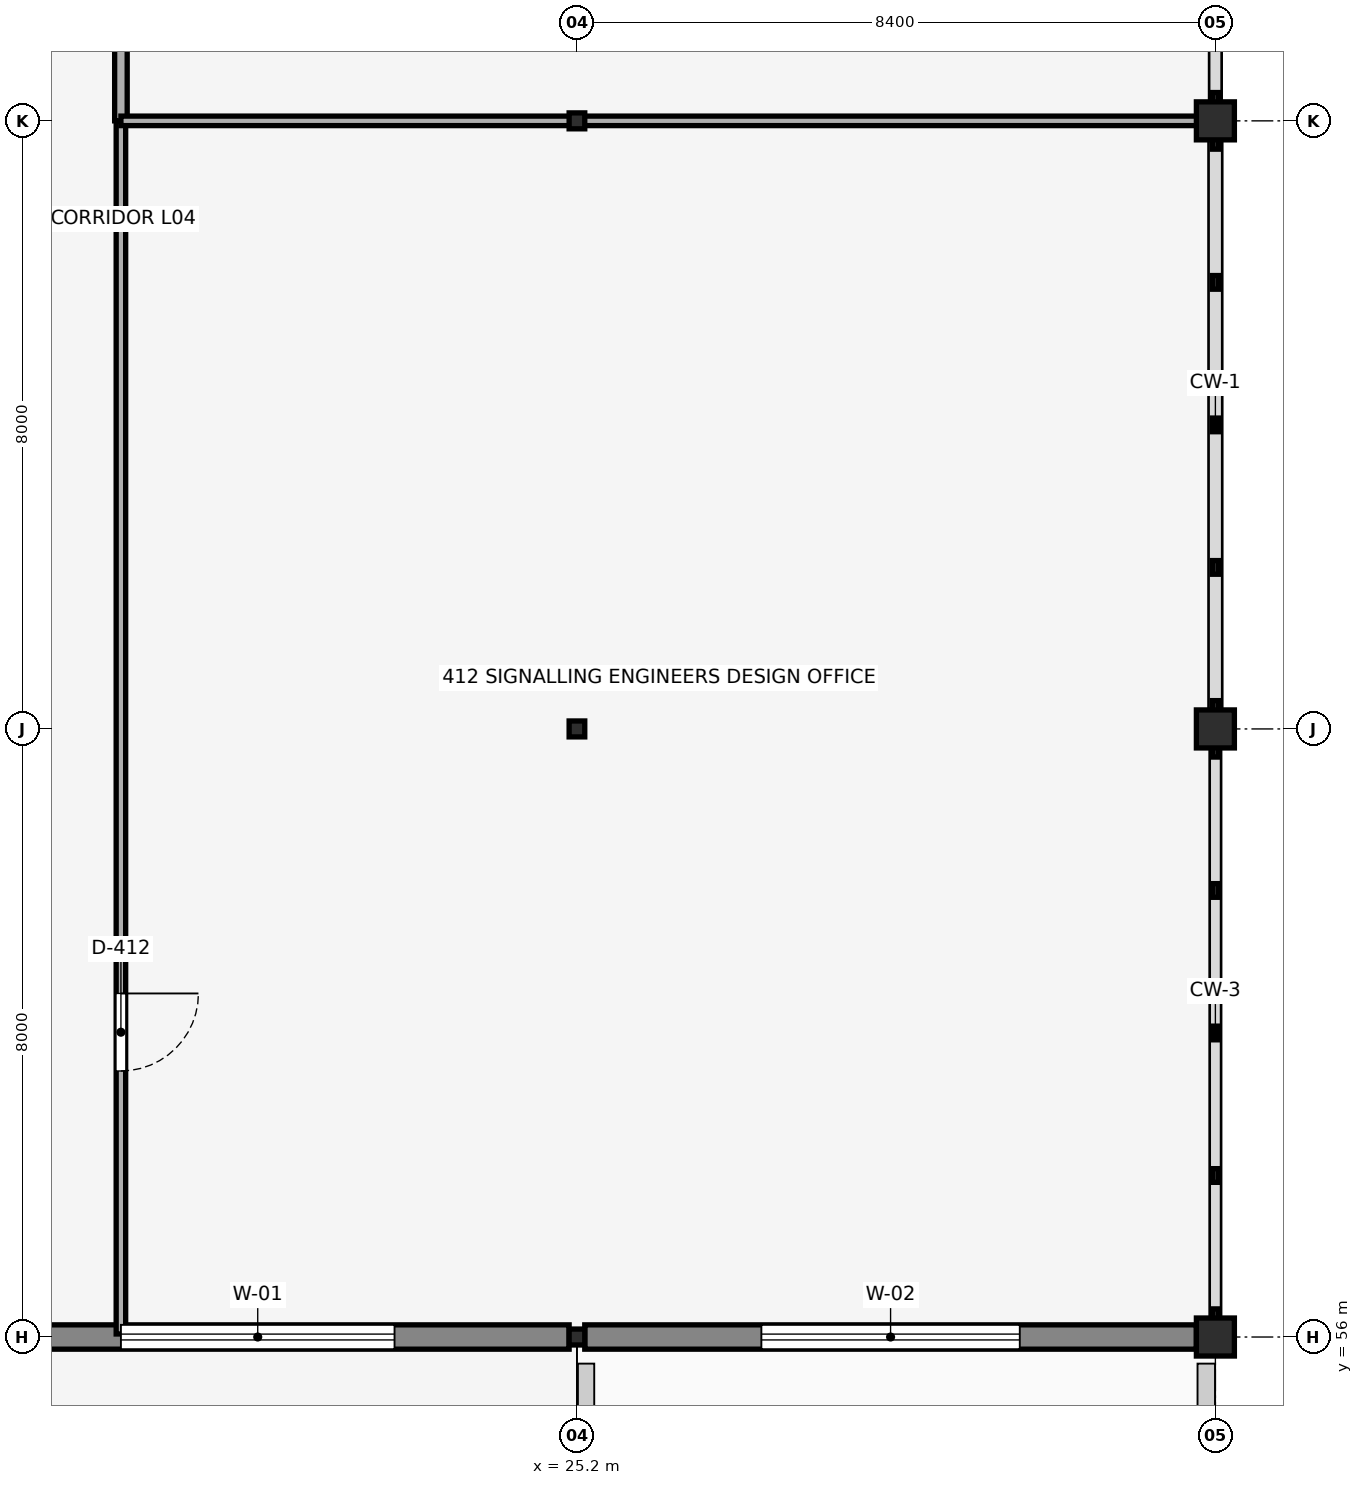
"""IFC4 building model, lengths in metres.
Left out: names, types, materials, properties, quantities, classifications, styles, units other than length and angle.
Written with IfcOpenShell. Run it as: python <this file> out.ifc"""

import sys

from ifc_helpers import new_model, si_unit, direction, frame, frame_2d, origin, origin_2d, place, context, subcontext, project, spatial, rectangle, i_section, extrude, element, fill, save


model = new_model("IFC4")
c1 = context("Model", 3, precision=1e-05, world=origin(), true_north=direction((0.0, 1.0)))
c2 = subcontext(c1, "Body", "Model", "MODEL_VIEW")
j1 = project(units=[si_unit("LENGTHUNIT", "METRE"), si_unit("PLANEANGLEUNIT", "RADIAN")], contexts=[c1])
p1 = place(None, origin())
s1 = spatial("IfcSite", under=j1, at=p1, CompositionType="ELEMENT")
p2 = place(p1, origin())
s2 = spatial("IfcBuilding", under=s1, at=p2, CompositionType="ELEMENT")
p3 = place(p2, frame((0.0, 0.0, 17.2)))
s3 = spatial("IfcBuildingStorey", under=s2, at=p3, CompositionType="ELEMENT", Elevation=17.2)
for number, where, z_axis, x_axis in (
    (1, (25.2, 56.0, 0.0), (0.0, 0.0, 1.0), (1.0, 0.0, 0.0)),
    (2, (25.2, 64.0, 0.0), (0.0, 0.0, 1.0), (1.0, 0.0, 0.0)),
    (3, (25.2, 72.0, 0.0), (0.0, 0.0, 1.0), (1.0, 0.0, 0.0)),
):
    element("IfcColumn", number, at=place(p3, frame(where, z_axis=z_axis, x_axis=x_axis)), inside=s3, PredefinedType="COLUMN", context=c2, shape_type="SweptSolid", body=[
        extrude(i_section(OverallWidth=0.206, OverallDepth=0.21, WebThickness=0.01, FlangeThickness=0.014, FilletRadius=0.01, at=origin_2d()), origin(), (0.0, 0.0, 1.0), 3.59),
    ])
for number, where, z_axis, x_axis in (
    (4, (33.6, 56.0, 0.0), (0.0, 0.0, 1.0), (1.0, 0.0, 0.0)),
    (5, (33.6, 64.0, 0.0), (0.0, 0.0, 1.0), (1.0, 0.0, 0.0)),
    (6, (33.6, 72.0, 0.0), (0.0, 0.0, 1.0), (1.0, 0.0, 0.0)),
):
    element("IfcColumn", number, at=place(p3, frame(where, z_axis=z_axis, x_axis=x_axis)), inside=s3, PredefinedType="COLUMN", context=c2, shape_type="SweptSolid", body=[
        extrude(rectangle(XDim=0.5, YDim=0.5, at=origin_2d()), origin(), (0.0, 0.0, 1.0), 3.59),
    ])
p4 = place(p3, frame((16.903, 56.0, 0.0), z_axis=(0.0, 0.0, 1.0), x_axis=(1.0, 0.0, 0.0)))
e7 = element("IfcWall", 7, at=p4, inside=s3, PredefinedType="SOLIDWALL", context=c2, shape_type="SweptSolid", body=[
    extrude(rectangle(XDim=8.194, YDim=0.32, at=frame_2d((4.097, 0.0))), origin(), (0.0, 0.0, 1.0), 3.33),
])
p5 = place(p4, frame((2.297, 0.0, 0.9), z_axis=(0.0, 0.0, 1.0), x_axis=(1.0, 0.0, 0.0)))
e8 = element("IfcOpeningElement", 8, at=p5, cuts=e7, PredefinedType="OPENING", context=c2, shape_type="SweptSolid", body=[
    extrude(rectangle(XDim=3.6, YDim=1.8, at=frame_2d((1.8, 0.9))), frame((0.0, 0.17, 0.0), z_axis=(0.0, -1.0, 0.0), x_axis=(1.0, 0.0, 0.0)), (0.0, 0.0, 1.0), 0.34),
])
p6 = place(p3, frame((25.303, 56.0, 0.0), z_axis=(0.0, 0.0, 1.0), x_axis=(1.0, 0.0, 0.0)))
e9 = element("IfcWall", 9, at=p6, inside=s3, PredefinedType="SOLIDWALL", context=c2, shape_type="SweptSolid", body=[
    extrude(rectangle(XDim=8.047, YDim=0.32, at=frame_2d((4.023, 0.0))), origin(), (0.0, 0.0, 1.0), 3.33),
])
p7 = place(p6, frame((2.323, 0.0, 0.9), z_axis=(0.0, 0.0, 1.0), x_axis=(1.0, 0.0, 0.0)))
e10 = element("IfcOpeningElement", 10, at=p7, cuts=e9, PredefinedType="OPENING", context=c2, shape_type="SweptSolid", body=[
    extrude(rectangle(XDim=3.4, YDim=1.7, at=frame_2d((1.7, 0.85))), frame((0.0, 0.17, 0.0), z_axis=(0.0, -1.0, 0.0), x_axis=(1.0, 0.0, 0.0)), (0.0, 0.0, 1.0), 0.34),
])
p8 = place(p3, frame((25.32, 48.12, 0.0), z_axis=(0.0, 0.0, 1.0), x_axis=(0.0, 1.0, 0.0)))
e11 = element("IfcWall", 11, at=p8, inside=s3, PredefinedType="PARAPET", context=c2, shape_type="SweptSolid", body=[
    extrude(rectangle(XDim=7.53, YDim=0.215, at=frame_2d((3.765, 0.0))), origin(), (0.0, 0.0, 1.0), 1.05),
])
p9 = place(p3, frame((33.48, 55.65, 0.0), z_axis=(0.0, 0.0, 1.0), x_axis=(0.0, -1.0, 0.0)))
e12 = element("IfcWall", 12, at=p9, inside=s3, PredefinedType="PARAPET", context=c2, shape_type="SweptSolid", body=[
    extrude(rectangle(XDim=7.53, YDim=0.23, at=frame_2d((3.765, 0.0))), origin(), (0.0, 0.0, 1.0), 1.05),
])
p10 = place(p3, frame((19.2, 56.04, 0.0), z_axis=(0.0, 0.0, 1.0), x_axis=(0.0, 1.0, 0.0)))
e13 = element("IfcWall", 13, at=p10, inside=s3, PredefinedType="PARTITIONING", context=c2, shape_type="SweptSolid", body=[
    extrude(rectangle(XDim=15.96, YDim=0.125, at=frame_2d((7.98, 0.0))), origin(), (0.0, 0.0, 1.0), 3.59),
])
p11 = place(p10, frame((4.48, 0.0, 0.0), z_axis=(0.0, 0.0, 1.0), x_axis=(-1.0, 0.0, 0.0)))
e14 = element("IfcOpeningElement", 14, at=p11, cuts=e13, PredefinedType="OPENING", context=c2, shape_type="SweptSolid", body=[
    extrude(rectangle(XDim=1.02, YDim=2.16, at=frame_2d((0.51, 1.08))), frame((0.0, 0.073, 0.0), z_axis=(0.0, -1.0, 0.0), x_axis=(1.0, 0.0, 0.0)), (0.0, 0.0, 1.0), 0.145),
])
p12 = place(p3, frame((19.2, 72.0, 0.0), z_axis=(0.0, 0.0, 1.0), x_axis=(0.0, 1.0, 0.0)))
e15 = element("IfcWall", 15, at=p12, inside=s3, PredefinedType="PARTITIONING", context=c2, shape_type="SweptSolid", body=[
    extrude(rectangle(XDim=16.0, YDim=0.165, at=frame_2d((8.0, 0.0))), origin(), (0.0, 0.0, 1.0), 3.59),
])
p13 = place(p12, frame((4.8, 0.0, 0.0), z_axis=(0.0, 0.0, 1.0), x_axis=(-1.0, 0.0, 0.0)))
e16 = element("IfcOpeningElement", 16, at=p13, cuts=e15, PredefinedType="OPENING", context=c2, shape_type="SweptSolid", body=[
    extrude(rectangle(XDim=1.3, YDim=2.25, at=frame_2d((0.65, 1.125))), frame((0.0, 0.093, 0.0), z_axis=(0.0, -1.0, 0.0), x_axis=(1.0, 0.0, 0.0)), (0.0, 0.0, 1.0), 0.185),
])
p14 = place(p3, frame((19.2, 72.0, 0.0), z_axis=(0.0, 0.0, 1.0), x_axis=(1.0, 0.0, 0.0)))
e17 = element("IfcWall", 17, at=p14, inside=s3, PredefinedType="PARTITIONING", context=c2, shape_type="SweptSolid", body=[
    extrude(rectangle(XDim=5.907, YDim=0.125, at=frame_2d((2.954, 0.0))), origin(), (0.0, 0.0, 1.0), 3.137),
])
p15 = place(p3, frame((25.293, 72.0, 0.0), z_axis=(0.0, 0.0, 1.0), x_axis=(1.0, 0.0, 0.0)))
e18 = element("IfcWall", 18, at=p15, inside=s3, PredefinedType="PARTITIONING", context=c2, shape_type="SweptSolid", body=[
    extrude(rectangle(XDim=8.067, YDim=0.125, at=frame_2d((4.034, 0.0))), origin(), (0.0, 0.0, 1.0), 3.137),
])
p16 = place(p5, origin())
e19 = element("IfcWindow", 19, at=p16, inside=s3, PartitioningType="TRIPLE_PANEL_VERTICAL", PredefinedType="WINDOW", context=c2, shape_type="SweptSolid", body=[
    extrude(rectangle(XDim=3.6, YDim=1.8, at=frame_2d((1.8, 0.9))), frame((0.0, 0.03, 0.0), z_axis=(0.0, -1.0, 0.0), x_axis=(1.0, 0.0, 0.0)), (0.0, 0.0, 1.0), 0.06),
])
fill(e8, e19)
p17 = place(p7, origin())
e20 = element("IfcWindow", 20, at=p17, inside=s3, PartitioningType="TRIPLE_PANEL_VERTICAL", PredefinedType="WINDOW", context=c2, shape_type="SweptSolid", body=[
    extrude(rectangle(XDim=3.4, YDim=1.7, at=frame_2d((1.7, 0.85))), frame((0.0, 0.03, 0.0), z_axis=(0.0, -1.0, 0.0), x_axis=(1.0, 0.0, 0.0)), (0.0, 0.0, 1.0), 0.06),
])
fill(e10, e20)
p18 = place(p11, origin())
e21 = element("IfcDoor", 21, at=p18, inside=s3, OperationType="SINGLE_SWING_LEFT", PredefinedType="DOOR", context=c2, shape_type="SweptSolid", body=[
    extrude(rectangle(XDim=1.02, YDim=2.16, at=frame_2d((0.51, 1.08))), frame((0.0, 0.025, 0.0), z_axis=(0.0, -1.0, 0.0), x_axis=(1.0, 0.0, 0.0)), (0.0, 0.0, 1.0), 0.05),
])
fill(e14, e21)
save(model, sys.argv[1])
